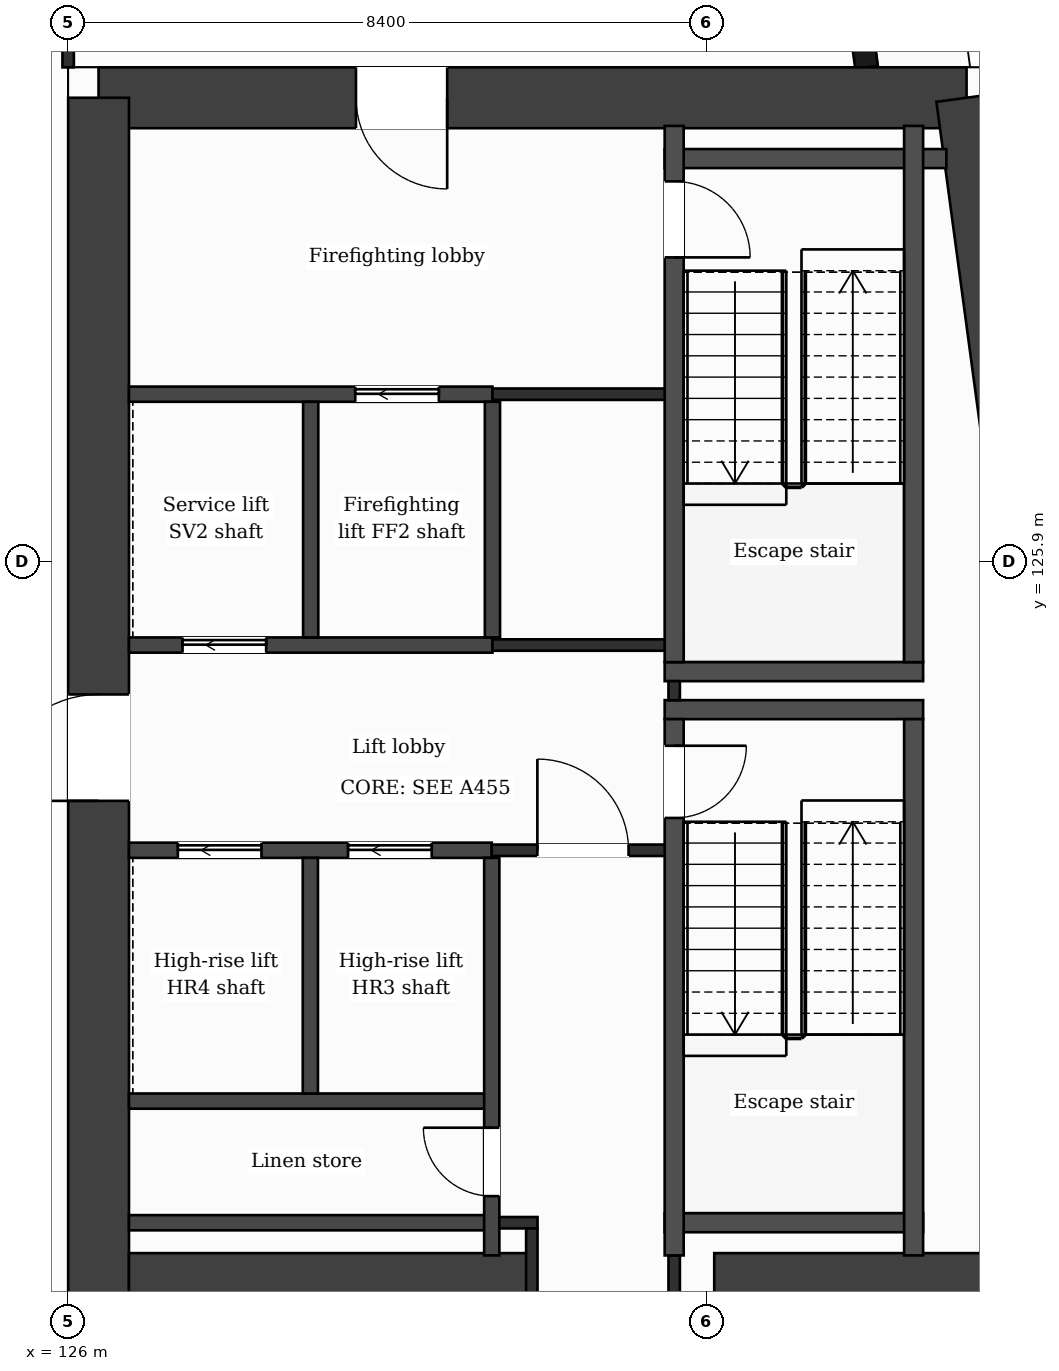
"""IFC4 building model, lengths in metres.
Left out: names, types, materials, properties, quantities, classifications, styles, units other than length and angle.
Written with IfcOpenShell. Run it as: python <this file> out.ifc"""

import sys

from ifc_helpers import new_model, si_unit, direction, frame, frame_2d, origin, place, context, subcontext, project, spatial, rectangle, extrude, element, fill, save


model = new_model("IFC4")
c1 = context("Model", 3, precision=1e-05, world=origin(), true_north=direction((0.0, 1.0)))
c2 = subcontext(c1, "Body", "Model", "MODEL_VIEW")
j1 = project(units=[si_unit("LENGTHUNIT", "METRE"), si_unit("PLANEANGLEUNIT", "RADIAN")], contexts=[c1])
p1 = place(None, origin())
s1 = spatial("IfcSite", under=j1, at=p1, CompositionType="ELEMENT")
p2 = place(p1, origin())
s2 = spatial("IfcBuilding", under=s1, at=p2, CompositionType="ELEMENT")
p3 = place(p2, frame((0.0, 0.0, 224.4)))
s3 = spatial("IfcBuildingStorey", under=s2, at=p3, CompositionType="ELEMENT", Elevation=224.4)
p4 = place(p3, frame((126.4, 132.0, 0.0), z_axis=(0.0, 0.0, 1.0), x_axis=(1.0, 0.0, 0.0)))
e1 = element("IfcWall", 1, at=p4, inside=s3, PredefinedType="SHEAR", context=c2, shape_type="SweptSolid", body=[
    extrude(rectangle(XDim=11.42, YDim=0.8, at=frame_2d((5.71, 0.0))), origin(), (0.0, 0.0, 1.0), 3.7),
])
p5 = place(p4, frame((3.386, 0.0, 0.0)))
e2 = element("IfcOpeningElement", 2, at=p5, cuts=e1, PredefinedType="OPENING", context=c2, shape_type="SweptSolid", body=[
    extrude(rectangle(XDim=1.2, YDim=2.1, at=frame_2d((0.6, 1.05))), frame((0.0, 0.41, 0.0), z_axis=(0.0, -1.0, 0.0), x_axis=(1.0, 0.0, 0.0)), (0.0, 0.0, 1.0), 0.82),
])
p6 = place(p3, frame((137.82, 132.0, 0.0), z_axis=(0.0, 0.0, 1.0), x_axis=(0.133408347329, -0.991061154956, 0.0)))
e3 = element("IfcWall", 3, at=p6, inside=s3, PredefinedType="SHEAR", context=c2, shape_type="SweptSolid", body=[
    extrude(rectangle(XDim=21.391, YDim=0.8, at=frame_2d((10.696, 0.0))), origin(), (0.0, 0.0, 1.0), 3.7),
])
p7 = place(p3, frame((126.4, 110.8, 0.0), z_axis=(0.0, 0.0, 1.0), x_axis=(0.0, 1.0, 0.0)))
e4 = element("IfcWall", 4, at=p7, inside=s3, PredefinedType="SHEAR", context=c2, shape_type="SweptSolid", body=[
    extrude(rectangle(XDim=21.2, YDim=0.8, at=frame_2d((10.6, 0.0))), origin(), (0.0, 0.0, 1.0), 3.7),
])
p8 = place(p7, frame((11.95, 0.0, 0.0)))
e5 = element("IfcOpeningElement", 5, at=p8, cuts=e4, PredefinedType="OPENING", context=c2, shape_type="SweptSolid", body=[
    extrude(rectangle(XDim=1.4, YDim=2.1, at=frame_2d((0.7, 1.05))), frame((0.0, 0.41, 0.0), z_axis=(0.0, -1.0, 0.0), x_axis=(1.0, 0.0, 0.0)), (0.0, 0.0, 1.0), 0.82),
])
p9 = place(p3, frame((126.8, 116.4, 0.0), z_axis=(0.0, 0.0, 1.0), x_axis=(1.0, 0.0, 0.0)))
e6 = element("IfcWall", 6, at=p9, inside=s3, PredefinedType="SHEAR", context=c2, shape_type="SweptSolid", body=[
    extrude(rectangle(XDim=5.3, YDim=0.8, at=frame_2d((2.65, 0.0))), origin(), (0.0, 0.0, 1.0), 3.7),
])
p10 = place(p3, frame((134.5, 116.4, 0.0), z_axis=(0.0, 0.0, 1.0), x_axis=(1.0, 0.0, 0.0)))
e7 = element("IfcWall", 7, at=p10, inside=s3, PredefinedType="SHEAR", context=c2, shape_type="SweptSolid", body=[
    extrude(rectangle(XDim=5.077, YDim=0.8, at=frame_2d((2.539, 0.0))), origin(), (0.0, 0.0, 1.0), 3.7),
])
p11 = place(p3, frame((136.504, 132.4, 0.0), z_axis=(0.0, 0.0, 1.0), x_axis=(-0.133399697462, 0.99106231929, 0.0)))
e8 = element("IfcWall", 8, at=p11, inside=s3, PredefinedType="SOLIDWALL", context=c2, shape_type="SweptSolid", body=[
    extrude(rectangle(XDim=6.74, YDim=0.3, at=frame_2d((3.37, 0.0))), origin(), (0.0, 0.0, 1.0), 3.38),
])
p12 = place(p11, frame((1.115, 0.0, 0.0)))
e9 = element("IfcOpeningElement", 9, at=p12, cuts=e8, PredefinedType="OPENING", context=c2, shape_type="SweptSolid", body=[
    extrude(rectangle(XDim=1.2, YDim=2.4, at=frame_2d((0.6, 1.2))), frame((0.0, 0.16, 0.0), z_axis=(0.0, -1.0, 0.0), x_axis=(1.0, 0.0, 0.0)), (0.0, 0.0, 1.0), 0.32),
])
p13 = place(p11, frame((3.835, 0.0, 0.9)))
e10 = element("IfcOpeningElement", 10, at=p13, cuts=e8, PredefinedType="OPENING", context=c2, shape_type="SweptSolid", body=[
    extrude(rectangle(XDim=2.4, YDim=2.1, at=frame_2d((1.2, 1.05))), frame((0.0, 0.16, 0.0), z_axis=(0.0, -1.0, 0.0), x_axis=(1.0, 0.0, 0.0)), (0.0, 0.0, 1.0), 0.32),
])
p14 = place(p3, frame((126.8, 117.2, 0.0), z_axis=(0.0, 0.0, 1.0), x_axis=(1.0, 0.0, 0.0)))
e11 = element("IfcWall", 11, at=p14, inside=s3, PredefinedType="PARTITIONING", context=c2, shape_type="SweptSolid", body=[
    extrude(rectangle(XDim=4.773, YDim=0.2, at=frame_2d((2.386, 0.0))), origin(), (0.0, 0.0, 1.0), 3.38),
])
p15 = place(p3, frame((131.573, 117.2, 0.0), z_axis=(0.0, 0.0, 1.0), x_axis=(1.0, 0.0, 0.0)))
e12 = element("IfcWall", 12, at=p15, inside=s3, PredefinedType="PARTITIONING", context=c2, shape_type="SweptSolid", body=[
    extrude(rectangle(XDim=0.602, YDim=0.15, at=frame_2d((0.301, 0.0))), origin(), (0.0, 0.0, 1.0), 3.38),
])
p16 = place(p3, frame((133.848, 117.2, 0.0), z_axis=(0.0, 0.0, 1.0), x_axis=(1.0, 0.0, 0.0)))
e13 = element("IfcWall", 13, at=p16, inside=s3, PredefinedType="PARTITIONING", context=c2, shape_type="SweptSolid", body=[
    extrude(rectangle(XDim=3.4, YDim=0.25, at=frame_2d((1.7, 0.0))), origin(), (0.0, 0.0, 1.0), 3.38),
])
p17 = place(p3, frame((126.8, 118.8, 0.0), z_axis=(0.0, 0.0, 1.0), x_axis=(1.0, 0.0, 0.0)))
e14 = element("IfcWall", 14, at=p17, inside=s3, PredefinedType="PARTITIONING", context=c2, shape_type="SweptSolid", body=[
    extrude(rectangle(XDim=4.773, YDim=0.2, at=frame_2d((2.386, 0.0))), origin(), (0.0, 0.0, 1.0), 3.38),
])
p18 = place(p3, frame((126.8, 122.1, 0.0), z_axis=(0.0, 0.0, 1.0), x_axis=(1.0, 0.0, 0.0)))
e15 = element("IfcWall", 15, at=p18, inside=s3, PredefinedType="PARTITIONING", context=c2, shape_type="SweptSolid", body=[
    extrude(rectangle(XDim=4.773, YDim=0.2, at=frame_2d((2.386, 0.0))), origin(), (0.0, 0.0, 1.0), 3.38),
])
p19 = place(p18, frame((2.883, 0.0, 0.0)))
e16 = element("IfcOpeningElement", 16, at=p19, cuts=e15, PredefinedType="OPENING", context=c2, shape_type="SweptSolid", body=[
    extrude(rectangle(XDim=1.1, YDim=2.1, at=frame_2d((0.55, 1.05))), frame((0.0, 0.11, 0.0), z_axis=(0.0, -1.0, 0.0), x_axis=(1.0, 0.0, 0.0)), (0.0, 0.0, 1.0), 0.22),
])
p20 = place(p18, frame((0.643, 0.0, 0.0)))
e17 = element("IfcOpeningElement", 17, at=p20, cuts=e15, PredefinedType="OPENING", context=c2, shape_type="SweptSolid", body=[
    extrude(rectangle(XDim=1.1, YDim=2.1, at=frame_2d((0.55, 1.05))), frame((0.0, 0.11, 0.0), z_axis=(0.0, -1.0, 0.0), x_axis=(1.0, 0.0, 0.0)), (0.0, 0.0, 1.0), 0.22),
])
p21 = place(p3, frame((131.573, 122.1, 0.0), z_axis=(0.0, 0.0, 1.0), x_axis=(1.0, 0.0, 0.0)))
e18 = element("IfcWall", 18, at=p21, inside=s3, PredefinedType="PARTITIONING", context=c2, shape_type="SweptSolid", body=[
    extrude(rectangle(XDim=2.4, YDim=0.15, at=frame_2d((1.2, 0.0))), origin(), (0.0, 0.0, 1.0), 3.38),
])
p22 = place(p21, frame((0.6, 0.0, 0.0)))
e19 = element("IfcOpeningElement", 19, at=p22, cuts=e18, PredefinedType="OPENING", context=c2, shape_type="SweptSolid", body=[
    extrude(rectangle(XDim=1.2, YDim=2.1, at=frame_2d((0.6, 1.05))), frame((0.0, 0.085, 0.0), z_axis=(0.0, -1.0, 0.0), x_axis=(1.0, 0.0, 0.0)), (0.0, 0.0, 1.0), 0.17),
])
for number, where, z_axis, x_axis in (
    (20, (133.848, 123.95, 0.0), (0.0, 0.0, 1.0), (1.0, 0.0, 0.0)),
    (21, (133.848, 124.45, 0.0), (0.0, 0.0, 1.0), (1.0, 0.0, 0.0)),
):
    element("IfcWall", number, at=place(p3, frame(where, z_axis=z_axis, x_axis=x_axis)), inside=s3, PredefinedType="PARTITIONING", context=c2, shape_type="SweptSolid", body=[
        extrude(rectangle(XDim=3.4, YDim=0.25, at=frame_2d((1.7, 0.0))), origin(), (0.0, 0.0, 1.0), 3.38),
    ])
p23 = place(p3, frame((126.8, 124.8, 0.0), z_axis=(0.0, 0.0, 1.0), x_axis=(1.0, 0.0, 0.0)))
e22 = element("IfcWall", 22, at=p23, inside=s3, PredefinedType="PARTITIONING", context=c2, shape_type="SweptSolid", body=[
    extrude(rectangle(XDim=4.782, YDim=0.2, at=frame_2d((2.391, 0.0))), origin(), (0.0, 0.0, 1.0), 3.38),
])
p24 = place(p23, frame((0.705, 0.0, 0.0)))
e23 = element("IfcOpeningElement", 23, at=p24, cuts=e22, PredefinedType="OPENING", context=c2, shape_type="SweptSolid", body=[
    extrude(rectangle(XDim=1.1, YDim=2.1, at=frame_2d((0.55, 1.05))), frame((0.0, 0.11, 0.0), z_axis=(0.0, -1.0, 0.0), x_axis=(1.0, 0.0, 0.0)), (0.0, 0.0, 1.0), 0.22),
])
p25 = place(p3, frame((131.582, 124.8, 0.0), z_axis=(0.0, 0.0, 1.0), x_axis=(1.0, 0.0, 0.0)))
e24 = element("IfcWall", 24, at=p25, inside=s3, PredefinedType="PARTITIONING", context=c2, shape_type="SweptSolid", body=[
    extrude(rectangle(XDim=2.516, YDim=0.15, at=frame_2d((1.258, 0.0))), origin(), (0.0, 0.0, 1.0), 3.38),
])
p26 = place(p3, frame((126.8, 128.1, 0.0), z_axis=(0.0, 0.0, 1.0), x_axis=(1.0, 0.0, 0.0)))
e25 = element("IfcWall", 25, at=p26, inside=s3, PredefinedType="PARTITIONING", context=c2, shape_type="SweptSolid", body=[
    extrude(rectangle(XDim=4.782, YDim=0.2, at=frame_2d((2.391, 0.0))), origin(), (0.0, 0.0, 1.0), 3.38),
])
p27 = place(p26, frame((2.977, 0.0, 0.0)))
e26 = element("IfcOpeningElement", 26, at=p27, cuts=e25, PredefinedType="OPENING", context=c2, shape_type="SweptSolid", body=[
    extrude(rectangle(XDim=1.1, YDim=2.1, at=frame_2d((0.55, 1.05))), frame((0.0, 0.11, 0.0), z_axis=(0.0, -1.0, 0.0), x_axis=(1.0, 0.0, 0.0)), (0.0, 0.0, 1.0), 0.22),
])
p28 = place(p3, frame((131.582, 128.1, 0.0), z_axis=(0.0, 0.0, 1.0), x_axis=(1.0, 0.0, 0.0)))
e27 = element("IfcWall", 27, at=p28, inside=s3, PredefinedType="PARTITIONING", context=c2, shape_type="SweptSolid", body=[
    extrude(rectangle(XDim=2.391, YDim=0.15, at=frame_2d((1.195, 0.0))), origin(), (0.0, 0.0, 1.0), 3.38),
])
p29 = place(p3, frame((133.848, 131.2, 0.0), z_axis=(0.0, 0.0, 1.0), x_axis=(1.0, 0.0, 0.0)))
e28 = element("IfcWall", 28, at=p29, inside=s3, PredefinedType="PARTITIONING", context=c2, shape_type="SweptSolid", body=[
    extrude(rectangle(XDim=3.706, YDim=0.25, at=frame_2d((1.853, 0.0))), origin(), (0.0, 0.0, 1.0), 3.38),
])
p30 = place(p3, frame((126.0, 132.4, 0.0), z_axis=(0.0, 0.0, 1.0), x_axis=(0.0, 1.0, 0.0)))
e29 = element("IfcWall", 29, at=p30, inside=s3, PredefinedType="PARTITIONING", context=c2, shape_type="SweptSolid", body=[
    extrude(rectangle(XDim=1.325, YDim=0.15, at=frame_2d((0.663, 0.0))), origin(), (0.0, 0.0, 1.0), 3.38),
])
for number, where, z_axis, x_axis in (
    (30, (129.187, 118.9, 0.0), (0.0, 0.0, 1.0), (0.0, 1.0, 0.0)),
    (31, (129.191, 124.9, 0.0), (0.0, 0.0, 1.0), (0.0, 1.0, 0.0)),
):
    element("IfcWall", number, at=place(p3, frame(where, z_axis=z_axis, x_axis=x_axis)), inside=s3, PredefinedType="PARTITIONING", context=c2, shape_type="SweptSolid", body=[
        extrude(rectangle(XDim=3.1, YDim=0.2, at=frame_2d((1.55, 0.0))), origin(), (0.0, 0.0, 1.0), 3.38),
    ])
p31 = place(p3, frame((131.573, 116.77, 0.0), z_axis=(0.0, 0.0, 1.0), x_axis=(0.0, 1.0, 0.0)))
e32 = element("IfcWall", 32, at=p31, inside=s3, PredefinedType="PARTITIONING", context=c2, shape_type="SweptSolid", body=[
    extrude(rectangle(XDim=5.23, YDim=0.2, at=frame_2d((2.615, 0.0))), origin(), (0.0, 0.0, 1.0), 3.38),
])
p32 = place(p31, frame((0.78, 0.0, 0.0)))
e33 = element("IfcOpeningElement", 33, at=p32, cuts=e32, PredefinedType="OPENING", context=c2, shape_type="SweptSolid", body=[
    extrude(rectangle(XDim=0.9, YDim=2.1, at=frame_2d((0.45, 1.05))), frame((0.0, 0.11, 0.0), z_axis=(0.0, -1.0, 0.0), x_axis=(1.0, 0.0, 0.0)), (0.0, 0.0, 1.0), 0.22),
])
p33 = place(p3, frame((131.582, 124.9, 0.0), z_axis=(0.0, 0.0, 1.0), x_axis=(0.0, 1.0, 0.0)))
e34 = element("IfcWall", 34, at=p33, inside=s3, PredefinedType="PARTITIONING", context=c2, shape_type="SweptSolid", body=[
    extrude(rectangle(XDim=3.1, YDim=0.2, at=frame_2d((1.55, 0.0))), origin(), (0.0, 0.0, 1.0), 3.38),
])
p34 = place(p3, frame((132.1, 116.0, 0.0), z_axis=(0.0, 0.0, 1.0), x_axis=(0.0, 1.0, 0.0)))
e35 = element("IfcWall", 35, at=p34, inside=s3, PredefinedType="PARTITIONING", context=c2, shape_type="SweptSolid", body=[
    extrude(rectangle(XDim=1.125, YDim=0.15, at=frame_2d((0.562, 0.0))), origin(), (0.0, 0.0, 1.0), 3.38),
])
p35 = place(p3, frame((133.973, 116.0, 0.0), z_axis=(0.0, 0.0, 1.0), x_axis=(0.0, 1.0, 0.0)))
e36 = element("IfcWall", 36, at=p35, inside=s3, PredefinedType="PARTITIONING", context=c2, shape_type="SweptSolid", body=[
    extrude(rectangle(XDim=0.77, YDim=0.15, at=frame_2d((0.385, 0.0))), origin(), (0.0, 0.0, 1.0), 3.38),
])
p36 = place(p3, frame((133.973, 124.075, 0.0), z_axis=(0.0, 0.0, 1.0), x_axis=(0.0, 1.0, 0.0)))
e37 = element("IfcWall", 37, at=p36, inside=s3, PredefinedType="PARTITIONING", context=c2, shape_type="SweptSolid", body=[
    extrude(rectangle(XDim=0.25, YDim=0.15, at=frame_2d((0.125, 0.0))), origin(), (0.0, 0.0, 1.0), 3.38),
])
p37 = place(p3, frame((133.973, 116.77, 0.0), z_axis=(0.0, 0.0, 1.0), x_axis=(0.0, 1.0, 0.0)))
e38 = element("IfcWall", 38, at=p37, inside=s3, PredefinedType="PARTITIONING", context=c2, shape_type="SweptSolid", body=[
    extrude(rectangle(XDim=7.055, YDim=0.25, at=frame_2d((3.527, 0.0))), origin(), (0.0, 0.0, 1.0), 3.38),
])
p38 = place(p37, frame((5.755, 0.0, 0.0)))
e39 = element("IfcOpeningElement", 39, at=p38, cuts=e38, PredefinedType="OPENING", context=c2, shape_type="SweptSolid", body=[
    extrude(rectangle(XDim=0.95, YDim=2.1, at=frame_2d((0.475, 1.05))), frame((0.0, 0.135, 0.0), z_axis=(0.0, -1.0, 0.0), x_axis=(1.0, 0.0, 0.0)), (0.0, 0.0, 1.0), 0.27),
])
p39 = place(p3, frame((133.973, 124.575, 0.0), z_axis=(0.0, 0.0, 1.0), x_axis=(0.0, 1.0, 0.0)))
e40 = element("IfcWall", 40, at=p39, inside=s3, PredefinedType="PARTITIONING", context=c2, shape_type="SweptSolid", body=[
    extrude(rectangle(XDim=7.055, YDim=0.25, at=frame_2d((3.527, 0.0))), origin(), (0.0, 0.0, 1.0), 3.38),
])
p40 = place(p39, frame((5.325, 0.0, 0.0)))
e41 = element("IfcOpeningElement", 41, at=p40, cuts=e40, PredefinedType="OPENING", context=c2, shape_type="SweptSolid", body=[
    extrude(rectangle(XDim=1.0, YDim=2.1, at=frame_2d((0.5, 1.05))), frame((0.0, 0.135, 0.0), z_axis=(0.0, -1.0, 0.0), x_axis=(1.0, 0.0, 0.0)), (0.0, 0.0, 1.0), 0.27),
])
for number, where, z_axis, x_axis in (
    (42, (137.123, 116.77, 0.0), (0.0, 0.0, 1.0), (0.0, 1.0, 0.0)),
    (43, (137.123, 124.575, 0.0), (0.0, 0.0, 1.0), (0.0, 1.0, 0.0)),
):
    element("IfcWall", number, at=place(p3, frame(where, z_axis=z_axis, x_axis=x_axis)), inside=s3, PredefinedType="PARTITIONING", context=c2, shape_type="SweptSolid", body=[
        extrude(rectangle(XDim=7.055, YDim=0.25, at=frame_2d((3.527, 0.0))), origin(), (0.0, 0.0, 1.0), 3.38),
    ])
p41 = place(p22, origin())
e44 = element("IfcDoor", 44, at=p41, inside=s3, OperationType="SINGLE_SWING_LEFT", PredefinedType="DOOR", context=c2, shape_type="SweptSolid", body=[
    extrude(rectangle(XDim=1.2, YDim=2.1, at=frame_2d((0.6, 1.05))), frame((0.0, 0.025, 0.0), z_axis=(0.0, -1.0, 0.0), x_axis=(1.0, 0.0, 0.0)), (0.0, 0.0, 1.0), 0.05),
])
fill(e19, e44)
p42 = place(p19, origin())
e45 = element("IfcDoor", 45, at=p42, inside=s3, OperationType="SLIDING_TO_LEFT", PredefinedType="DOOR", context=c2, shape_type="SweptSolid", body=[
    extrude(rectangle(XDim=1.1, YDim=2.1, at=frame_2d((0.55, 1.05))), frame((0.0, 0.025, 0.0), z_axis=(0.0, -1.0, 0.0), x_axis=(1.0, 0.0, 0.0)), (0.0, 0.0, 1.0), 0.05),
])
fill(e16, e45)
p43 = place(p20, origin())
e46 = element("IfcDoor", 46, at=p43, inside=s3, OperationType="SLIDING_TO_LEFT", PredefinedType="DOOR", context=c2, shape_type="SweptSolid", body=[
    extrude(rectangle(XDim=1.1, YDim=2.1, at=frame_2d((0.55, 1.05))), frame((0.0, 0.025, 0.0), z_axis=(0.0, -1.0, 0.0), x_axis=(1.0, 0.0, 0.0)), (0.0, 0.0, 1.0), 0.05),
])
fill(e17, e46)
p44 = place(p27, origin())
e47 = element("IfcDoor", 47, at=p44, inside=s3, OperationType="SLIDING_TO_LEFT", PredefinedType="DOOR", context=c2, shape_type="SweptSolid", body=[
    extrude(rectangle(XDim=1.1, YDim=2.1, at=frame_2d((0.55, 1.05))), frame((0.0, 0.025, 0.0), z_axis=(0.0, -1.0, 0.0), x_axis=(1.0, 0.0, 0.0)), (0.0, 0.0, 1.0), 0.05),
])
fill(e26, e47)
p45 = place(p24, origin())
e48 = element("IfcDoor", 48, at=p45, inside=s3, OperationType="SLIDING_TO_LEFT", PredefinedType="DOOR", context=c2, shape_type="SweptSolid", body=[
    extrude(rectangle(XDim=1.1, YDim=2.1, at=frame_2d((0.55, 1.05))), frame((0.0, 0.025, 0.0), z_axis=(0.0, -1.0, 0.0), x_axis=(1.0, 0.0, 0.0)), (0.0, 0.0, 1.0), 0.05),
])
fill(e23, e48)
p46 = place(p38, origin())
e49 = element("IfcDoor", 49, at=p46, inside=s3, OperationType="SINGLE_SWING_RIGHT", PredefinedType="DOOR", context=c2, shape_type="SweptSolid", body=[
    extrude(rectangle(XDim=0.95, YDim=2.1, at=frame_2d((0.475, 1.05))), frame((0.0, 0.025, 0.0), z_axis=(0.0, -1.0, 0.0), x_axis=(1.0, 0.0, 0.0)), (0.0, 0.0, 1.0), 0.05),
])
fill(e39, e49)
p47 = place(p40, origin())
e50 = element("IfcDoor", 50, at=p47, inside=s3, OperationType="SINGLE_SWING_LEFT", PredefinedType="DOOR", context=c2, shape_type="SweptSolid", body=[
    extrude(rectangle(XDim=1.0, YDim=2.1, at=frame_2d((0.5, 1.05))), frame((0.0, 0.025, 0.0), z_axis=(0.0, -1.0, 0.0), x_axis=(1.0, 0.0, 0.0)), (0.0, 0.0, 1.0), 0.05),
])
fill(e41, e50)
p48 = place(p32, origin())
e51 = element("IfcDoor", 51, at=p48, inside=s3, OperationType="SINGLE_SWING_RIGHT", PredefinedType="DOOR", context=c2, shape_type="SweptSolid", body=[
    extrude(rectangle(XDim=0.9, YDim=2.1, at=frame_2d((0.45, 1.05))), frame((0.0, 0.025, 0.0), z_axis=(0.0, -1.0, 0.0), x_axis=(1.0, 0.0, 0.0)), (0.0, 0.0, 1.0), 0.05),
])
fill(e33, e51)
p49 = place(p5, origin())
e52 = element("IfcDoor", 52, at=p49, inside=s3, OperationType="SINGLE_SWING_RIGHT", PredefinedType="DOOR", context=c2, shape_type="SweptSolid", body=[
    extrude(rectangle(XDim=1.2, YDim=2.1, at=frame_2d((0.6, 1.05))), frame((0.0, 0.025, 0.0), z_axis=(0.0, -1.0, 0.0), x_axis=(1.0, 0.0, 0.0)), (0.0, 0.0, 1.0), 0.05),
])
fill(e2, e52)
p50 = place(p8, origin())
e53 = element("IfcDoor", 53, at=p50, inside=s3, OperationType="SINGLE_SWING_LEFT", PredefinedType="DOOR", context=c2, shape_type="SweptSolid", body=[
    extrude(rectangle(XDim=1.4, YDim=2.1, at=frame_2d((0.7, 1.05))), frame((0.0, 0.025, 0.0), z_axis=(0.0, -1.0, 0.0), x_axis=(1.0, 0.0, 0.0)), (0.0, 0.0, 1.0), 0.05),
])
fill(e5, e53)
save(model, sys.argv[1])
